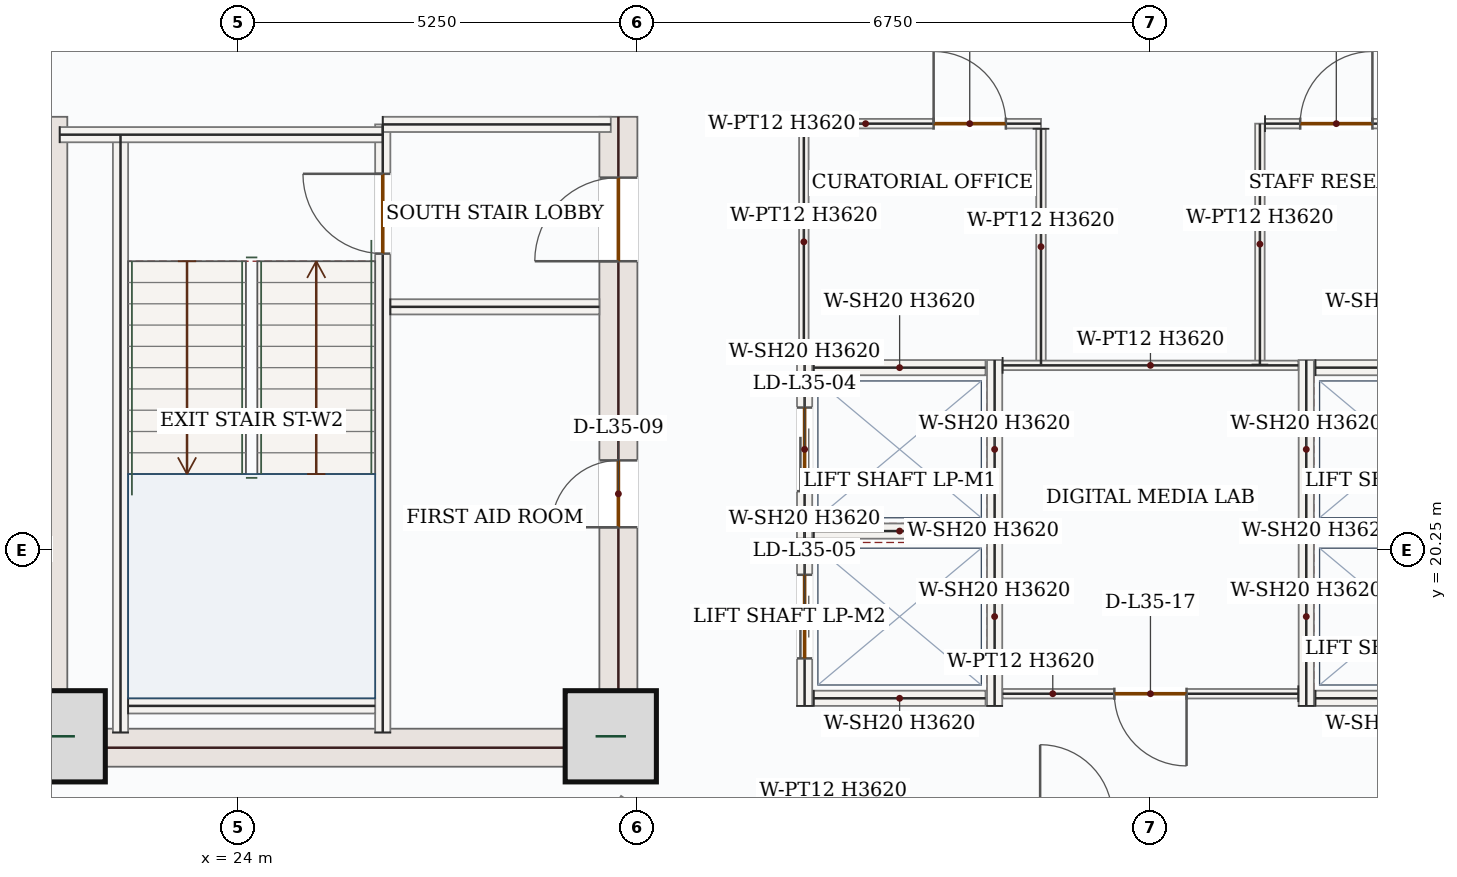
"""IFC4 building model, lengths in metres.
Left out: names, types, materials, properties, quantities, classifications, styles, units other than length and angle.
Written with IfcOpenShell. Run it as: python <this file> out.ifc"""

import sys

from ifc_helpers import new_model, si_unit, direction, frame, frame_2d, origin, origin_2d, place, context, subcontext, project, spatial, rectangle, extrude, source, transform, mapped, element, fill, save


model = new_model("IFC4")
c1 = context("Model", 3, precision=1e-05, world=origin(), true_north=direction((0.0, 1.0)))
c2 = subcontext(c1, "Body", "Model", "MODEL_VIEW")
j1 = project(units=[si_unit("LENGTHUNIT", "METRE"), si_unit("PLANEANGLEUNIT", "RADIAN")], contexts=[c1])
p1 = place(None, origin())
s1 = spatial("IfcSite", under=j1, at=p1, CompositionType="ELEMENT")
p2 = place(p1, origin())
s2 = spatial("IfcBuilding", under=s1, at=p2, CompositionType="ELEMENT")
p3 = place(p2, frame((0.0, 0.0, 155.1)))
s3 = spatial("IfcBuildingStorey", under=s2, at=p3, CompositionType="ELEMENT", Elevation=155.1)
m1 = source(origin(), c2, "Body", "SweptSolid", [
    extrude(rectangle(XDim=8.55, YDim=0.5, at=frame_2d((4.275, 0.0))), origin(), (0.0, 0.0, 1.0), 3.62),
])
p4 = place(p3, frame((21.5, 17.4, 0.0), z_axis=(0.0, 0.0, 1.0), x_axis=(0.0, 1.0, 0.0)))
e1 = element("IfcWall", 1, at=p4, inside=s3, PredefinedType="SHEAR", context=c2, shape_type="MappedRepresentation", body=[
    mapped(m1, transform((0.0, 0.0, 0.0), x_axis=(1.0, 0.0, 0.0), y_axis=(0.0, 1.0, 0.0), z_axis=(0.0, 0.0, 1.0), scale=1.0)),
])
p5 = place(p3, frame((29.0, 17.4, 0.0), z_axis=(0.0, 0.0, 1.0), x_axis=(0.0, 1.0, 0.0)))
e2 = element("IfcWall", 2, at=p5, inside=s3, PredefinedType="SHEAR", context=c2, shape_type="SweptSolid", body=[
    extrude(rectangle(XDim=8.55, YDim=0.5, at=frame_2d((4.275, 0.0))), origin(), (0.0, 0.0, 1.0), 3.62),
])
p6 = place(p5, frame((6.65, 0.0, 0.0)))
e3 = element("IfcOpeningElement", 3, at=p6, cuts=e2, PredefinedType="OPENING", context=c2, shape_type="SweptSolid", body=[
    extrude(rectangle(XDim=1.1, YDim=2.2, at=frame_2d((0.55, 1.1))), frame((0.0, 0.26, 0.0), z_axis=(0.0, -1.0, 0.0), x_axis=(1.0, 0.0, 0.0)), (0.0, 0.0, 1.0), 0.52),
])
p7 = place(p5, frame((3.15, 0.0, 0.0)))
e4 = element("IfcOpeningElement", 4, at=p7, cuts=e2, PredefinedType="OPENING", context=c2, shape_type="SweptSolid", body=[
    extrude(rectangle(XDim=0.88, YDim=2.1, at=frame_2d((0.44, 1.05))), frame((0.0, 0.26, 0.0), z_axis=(0.0, -1.0, 0.0), x_axis=(1.0, 0.0, 0.0)), (0.0, 0.0, 1.0), 0.52),
])
m2 = source(origin(), c2, "Body", "SweptSolid", [
    extrude(rectangle(XDim=7.0, YDim=0.5, at=frame_2d((3.5, 0.0))), origin(), (0.0, 0.0, 1.0), 3.62),
])
p8 = place(p3, frame((21.75, 17.65, 0.0), z_axis=(0.0, 0.0, 1.0), x_axis=(1.0, 0.0, 0.0)))
e5 = element("IfcWall", 5, at=p8, inside=s3, PredefinedType="SHEAR", context=c2, shape_type="MappedRepresentation", body=[
    mapped(m2, transform((0.0, 0.0, 0.0), x_axis=(1.0, 0.0, 0.0), y_axis=(0.0, 1.0, 0.0), z_axis=(0.0, 0.0, 1.0), scale=1.0)),
])
m3 = source(origin(), c2, "Body", "SweptSolid", [
    extrude(rectangle(XDim=1.2, YDim=1.2, at=origin_2d()), origin(), (0.0, 0.0, 1.0), 3.9),
])
for number, where, z_axis, x_axis in (
    (6, (21.65, 17.8, 0.0), (0.0, 0.0, 1.0), (1.0, 0.0, 0.0)),
    (7, (28.9, 17.8, 0.0), (0.0, 0.0, 1.0), (1.0, 0.0, 0.0)),
):
    element("IfcColumn", number, at=place(p3, frame(where, z_axis=z_axis, x_axis=x_axis)), inside=s3, PredefinedType="COLUMN", context=c2, shape_type="MappedRepresentation", body=[
        mapped(m3, transform((0.0, 0.0, 0.0), x_axis=(1.0, 0.0, 0.0), y_axis=(0.0, 1.0, 0.0), z_axis=(0.0, 0.0, 1.0), scale=1.0)),
    ])
p9 = place(p3, frame((22.658, 14.74, 0.0), z_axis=(0.0, 0.0, 1.0), x_axis=(-0.707106781187, 0.707106781187, 0.0)))
e8 = element("IfcWall", 8, at=p9, inside=s3, PredefinedType="SOLIDWALL", context=c2, shape_type="SweptSolid", body=[
    extrude(rectangle(XDim=3.544, YDim=0.28, at=frame_2d((1.772, 0.0))), origin(), (0.0, 0.0, 1.0), 3.62),
])
p10 = place(p9, frame((0.872, 0.0, 0.85)))
e9 = element("IfcOpeningElement", 9, at=p10, cuts=e8, PredefinedType="OPENING", context=c2, shape_type="SweptSolid", body=[
    extrude(rectangle(XDim=1.8, YDim=1.75, at=frame_2d((0.9, 0.875))), frame((0.0, 0.15, 0.0), z_axis=(0.0, -1.0, 0.0), x_axis=(1.0, 0.0, 0.0)), (0.0, 0.0, 1.0), 0.3),
])
m4 = source(origin(), c2, "Body", "SweptSolid", [
    extrude(rectangle(XDim=7.87, YDim=0.2, at=frame_2d((3.935, 0.0))), origin(), (0.0, 0.0, 1.0), 3.62),
])
p11 = place(p3, frame((22.45, 17.85, 0.0), z_axis=(0.0, 0.0, 1.0), x_axis=(0.0, 1.0, 0.0)))
e10 = element("IfcWall", 10, at=p11, inside=s3, PredefinedType="SOLIDWALL", context=c2, shape_type="MappedRepresentation", body=[
    mapped(m4, transform((0.0, 0.0, 0.0), x_axis=(1.0, 0.0, 0.0), y_axis=(0.0, 1.0, 0.0), z_axis=(0.0, 0.0, 1.0), scale=1.0)),
])
p12 = place(p3, frame((25.9, 17.85, 0.0), z_axis=(0.0, 0.0, 1.0), x_axis=(0.0, 1.0, 0.0)))
e11 = element("IfcWall", 11, at=p12, inside=s3, PredefinedType="SOLIDWALL", context=c2, shape_type="SweptSolid", body=[
    extrude(rectangle(XDim=8.0, YDim=0.2, at=frame_2d((4.0, 0.0))), origin(), (0.0, 0.0, 1.0), 3.62),
])
p13 = place(p12, frame((6.3, 0.0, 0.0)))
e12 = element("IfcOpeningElement", 12, at=p13, cuts=e11, PredefinedType="OPENING", context=c2, shape_type="SweptSolid", body=[
    extrude(rectangle(XDim=1.05, YDim=2.15, at=frame_2d((0.525, 1.075))), frame((0.0, 0.11, 0.0), z_axis=(0.0, -1.0, 0.0), x_axis=(1.0, 0.0, 0.0)), (0.0, 0.0, 1.0), 0.22),
])
m5 = source(origin(), c2, "Body", "SweptSolid", [
    extrude(rectangle(XDim=4.25, YDim=0.2, at=frame_2d((2.125, 0.0))), origin(), (0.0, 0.0, 1.0), 3.62),
])
p14 = place(p3, frame((21.65, 25.715, 0.0), z_axis=(0.0, 0.0, 1.0), x_axis=(1.0, 0.0, 0.0)))
e13 = element("IfcWall", 13, at=p14, inside=s3, PredefinedType="SOLIDWALL", context=c2, shape_type="MappedRepresentation", body=[
    mapped(m5, transform((0.0, 0.0, 0.0), x_axis=(1.0, 0.0, 0.0), y_axis=(0.0, 1.0, 0.0), z_axis=(0.0, 0.0, 1.0), scale=1.0)),
])
m6 = source(origin(), c2, "Body", "SweptSolid", [
    extrude(rectangle(XDim=3.0, YDim=0.2, at=frame_2d((1.5, 0.0))), origin(), (0.0, 0.0, 1.0), 3.62),
])
p15 = place(p3, frame((25.9, 25.85, 0.0), z_axis=(0.0, 0.0, 1.0), x_axis=(1.0, 0.0, 0.0)))
e14 = element("IfcWall", 14, at=p15, inside=s3, PredefinedType="SOLIDWALL", context=c2, shape_type="MappedRepresentation", body=[
    mapped(m6, transform((0.0, 0.0, 0.0), x_axis=(1.0, 0.0, 0.0), y_axis=(0.0, 1.0, 0.0), z_axis=(0.0, 0.0, 1.0), scale=1.0)),
])
m7 = source(origin(), c2, "Body", "SweptSolid", [
    extrude(rectangle(XDim=3.25, YDim=0.2, at=frame_2d((1.625, 0.0))), origin(), (0.0, 0.0, 1.0), 3.62),
])
p16 = place(p3, frame((22.55, 18.2, 0.0), z_axis=(0.0, 0.0, 1.0), x_axis=(1.0, 0.0, 0.0)))
e15 = element("IfcWall", 15, at=p16, inside=s3, PredefinedType="SOLIDWALL", context=c2, shape_type="MappedRepresentation", body=[
    mapped(m7, transform((0.0, 0.0, 0.0), x_axis=(1.0, 0.0, 0.0), y_axis=(0.0, 1.0, 0.0), z_axis=(0.0, 0.0, 1.0), scale=1.0)),
])
m8 = source(origin(), c2, "Body", "SweptSolid", [
    extrude(rectangle(XDim=2.75, YDim=0.2, at=frame_2d((1.375, 0.0))), origin(), (0.0, 0.0, 1.0), 3.62),
])
p17 = place(p3, frame((26.0, 23.45, 0.0), z_axis=(0.0, 0.0, 1.0), x_axis=(1.0, 0.0, 0.0)))
e16 = element("IfcWall", 16, at=p17, inside=s3, PredefinedType="SOLIDWALL", context=c2, shape_type="MappedRepresentation", body=[
    mapped(m8, transform((0.0, 0.0, 0.0), x_axis=(1.0, 0.0, 0.0), y_axis=(0.0, 1.0, 0.0), z_axis=(0.0, 0.0, 1.0), scale=1.0)),
])
p18 = place(p3, frame((31.45, 20.4, 0.0), z_axis=(0.0, 0.0, 1.0), x_axis=(0.0, 1.0, 0.0)))
e17 = element("IfcWall", 17, at=p18, inside=s3, PredefinedType="SOLIDWALL", context=c2, shape_type="SweptSolid", body=[
    extrude(rectangle(XDim=2.35, YDim=0.2, at=frame_2d((1.175, 0.0))), origin(), (0.0, 0.0, 1.0), 3.62),
])
p19 = place(p18, frame((0.625, 0.0, 0.0)))
e18 = element("IfcOpeningElement", 18, at=p19, cuts=e17, PredefinedType="OPENING", context=c2, shape_type="SweptSolid", body=[
    extrude(rectangle(XDim=1.1, YDim=2.15, at=frame_2d((0.55, 1.075))), frame((0.0, 0.11, 0.0), z_axis=(0.0, -1.0, 0.0), x_axis=(1.0, 0.0, 0.0)), (0.0, 0.0, 1.0), 0.22),
])
m9 = source(origin(), c2, "Body", "SweptSolid", [
    extrude(rectangle(XDim=2.35, YDim=0.2, at=frame_2d((1.175, 0.0))), origin(), (0.0, 0.0, 1.0), 3.62),
])
p20 = place(p3, frame((33.95, 20.4, 0.0), z_axis=(0.0, 0.0, 1.0), x_axis=(0.0, 1.0, 0.0)))
e19 = element("IfcWall", 19, at=p20, inside=s3, PredefinedType="SOLIDWALL", context=c2, shape_type="MappedRepresentation", body=[
    mapped(m9, transform((0.0, 0.0, 0.0), x_axis=(1.0, 0.0, 0.0), y_axis=(0.0, 1.0, 0.0), z_axis=(0.0, 0.0, 1.0), scale=1.0)),
])
m10 = source(origin(), c2, "Body", "SweptSolid", [
    extrude(rectangle(XDim=2.26, YDim=0.2, at=frame_2d((1.13, 0.0))), origin(), (0.0, 0.0, 1.0), 3.62),
])
for number, where, z_axis, x_axis in (
    (20, (31.57, 20.5, 0.0), (0.0, 0.0, 1.0), (1.0, 0.0, 0.0)),
    (21, (31.57, 22.65, 0.0), (0.0, 0.0, 1.0), (1.0, 0.0, 0.0)),
):
    element("IfcWall", number, at=place(p3, frame(where, z_axis=z_axis, x_axis=x_axis)), inside=s3, PredefinedType="SOLIDWALL", context=c2, shape_type="MappedRepresentation", body=[
        mapped(m10, transform((0.0, 0.0, 0.0), x_axis=(1.0, 0.0, 0.0), y_axis=(0.0, 1.0, 0.0), z_axis=(0.0, 0.0, 1.0), scale=1.0)),
    ])
p21 = place(p3, frame((31.45, 18.2, 0.0), z_axis=(0.0, 0.0, 1.0), x_axis=(0.0, 1.0, 0.0)))
e22 = element("IfcWall", 22, at=p21, inside=s3, PredefinedType="SOLIDWALL", context=c2, shape_type="SweptSolid", body=[
    extrude(rectangle(XDim=2.35, YDim=0.2, at=frame_2d((1.175, 0.0))), origin(), (0.0, 0.0, 1.0), 3.62),
])
p22 = place(p21, frame((0.625, 0.0, 0.0)))
e23 = element("IfcOpeningElement", 23, at=p22, cuts=e22, PredefinedType="OPENING", context=c2, shape_type="SweptSolid", body=[
    extrude(rectangle(XDim=1.1, YDim=2.15, at=frame_2d((0.55, 1.075))), frame((0.0, 0.11, 0.0), z_axis=(0.0, -1.0, 0.0), x_axis=(1.0, 0.0, 0.0)), (0.0, 0.0, 1.0), 0.22),
])
p23 = place(p3, frame((33.95, 18.2, 0.0), z_axis=(0.0, 0.0, 1.0), x_axis=(0.0, 1.0, 0.0)))
e24 = element("IfcWall", 24, at=p23, inside=s3, PredefinedType="SOLIDWALL", context=c2, shape_type="MappedRepresentation", body=[
    mapped(m9, transform((0.0, 0.0, 0.0), x_axis=(1.0, 0.0, 0.0), y_axis=(0.0, 1.0, 0.0), z_axis=(0.0, 0.0, 1.0), scale=1.0)),
])
p24 = place(p3, frame((31.57, 18.3, 0.0), z_axis=(0.0, 0.0, 1.0), x_axis=(1.0, 0.0, 0.0)))
e25 = element("IfcWall", 25, at=p24, inside=s3, PredefinedType="SOLIDWALL", context=c2, shape_type="MappedRepresentation", body=[
    mapped(m10, transform((0.0, 0.0, 0.0), x_axis=(1.0, 0.0, 0.0), y_axis=(0.0, 1.0, 0.0), z_axis=(0.0, 0.0, 1.0), scale=1.0)),
])
p25 = place(p3, frame((38.05, 20.4, 0.0), z_axis=(0.0, 0.0, 1.0), x_axis=(0.0, 1.0, 0.0)))
e26 = element("IfcWall", 26, at=p25, inside=s3, PredefinedType="SOLIDWALL", context=c2, shape_type="MappedRepresentation", body=[
    mapped(m9, transform((0.0, 0.0, 0.0), x_axis=(1.0, 0.0, 0.0), y_axis=(0.0, 1.0, 0.0), z_axis=(0.0, 0.0, 1.0), scale=1.0)),
])
for number, where, z_axis, x_axis in (
    (27, (38.17, 20.5, 0.0), (0.0, 0.0, 1.0), (1.0, 0.0, 0.0)),
    (28, (38.17, 22.65, 0.0), (0.0, 0.0, 1.0), (1.0, 0.0, 0.0)),
):
    element("IfcWall", number, at=place(p3, frame(where, z_axis=z_axis, x_axis=x_axis)), inside=s3, PredefinedType="SOLIDWALL", context=c2, shape_type="MappedRepresentation", body=[
        mapped(m10, transform((0.0, 0.0, 0.0), x_axis=(1.0, 0.0, 0.0), y_axis=(0.0, 1.0, 0.0), z_axis=(0.0, 0.0, 1.0), scale=1.0)),
    ])
p26 = place(p3, frame((38.05, 18.2, 0.0), z_axis=(0.0, 0.0, 1.0), x_axis=(0.0, 1.0, 0.0)))
e29 = element("IfcWall", 29, at=p26, inside=s3, PredefinedType="SOLIDWALL", context=c2, shape_type="MappedRepresentation", body=[
    mapped(m9, transform((0.0, 0.0, 0.0), x_axis=(1.0, 0.0, 0.0), y_axis=(0.0, 1.0, 0.0), z_axis=(0.0, 0.0, 1.0), scale=1.0)),
])
p27 = place(p3, frame((38.17, 18.3, 0.0), z_axis=(0.0, 0.0, 1.0), x_axis=(1.0, 0.0, 0.0)))
e30 = element("IfcWall", 30, at=p27, inside=s3, PredefinedType="SOLIDWALL", context=c2, shape_type="MappedRepresentation", body=[
    mapped(m10, transform((0.0, 0.0, 0.0), x_axis=(1.0, 0.0, 0.0), y_axis=(0.0, 1.0, 0.0), z_axis=(0.0, 0.0, 1.0), scale=1.0)),
])
m11 = source(origin(), c2, "Body", "SweptSolid", [
    extrude(rectangle(XDim=3.11, YDim=0.125, at=frame_2d((1.555, 0.0))), origin(), (0.0, 0.0, 1.0), 3.62),
])
p28 = place(p3, frame((31.44, 22.75, 0.0), z_axis=(0.0, 0.0, 1.0), x_axis=(0.0, 1.0, 0.0)))
e31 = element("IfcWall", 31, at=p28, inside=s3, PredefinedType="PARTITIONING", context=c2, shape_type="MappedRepresentation", body=[
    mapped(m11, transform((0.0, 0.0, 0.0), x_axis=(1.0, 0.0, 0.0), y_axis=(0.0, 1.0, 0.0), z_axis=(0.0, 0.0, 1.0), scale=1.0)),
])
p29 = place(p3, frame((31.508, 25.86, 0.0), z_axis=(0.0, 0.0, 1.0), x_axis=(1.0, 0.0, 0.0)))
e32 = element("IfcWall", 32, at=p29, inside=s3, PredefinedType="PARTITIONING", context=c2, shape_type="SweptSolid", body=[
    extrude(rectangle(XDim=3.052, YDim=0.125, at=frame_2d((1.526, 0.0))), origin(), (0.0, 0.0, 1.0), 3.62),
])
p30 = place(p29, frame((1.64, 0.0, 0.0)))
e33 = element("IfcOpeningElement", 33, at=p30, cuts=e32, PredefinedType="OPENING", context=c2, shape_type="SweptSolid", body=[
    extrude(rectangle(XDim=0.95, YDim=2.15, at=frame_2d((0.475, 1.075))), frame((0.0, 0.073, 0.0), z_axis=(0.0, -1.0, 0.0), x_axis=(1.0, 0.0, 0.0)), (0.0, 0.0, 1.0), 0.145),
])
m12 = source(origin(), c2, "Body", "SweptSolid", [
    extrude(rectangle(XDim=3.103, YDim=0.125, at=frame_2d((1.551, 0.0))), origin(), (0.0, 0.0, 1.0), 3.62),
])
p31 = place(p3, frame((34.56, 25.792, 0.0), z_axis=(0.0, 0.0, 1.0), x_axis=(0.0, -1.0, 0.0)))
e34 = element("IfcWall", 34, at=p31, inside=s3, PredefinedType="PARTITIONING", context=c2, shape_type="MappedRepresentation", body=[
    mapped(m12, transform((0.0, 0.0, 0.0), x_axis=(1.0, 0.0, 0.0), y_axis=(0.0, 1.0, 0.0), z_axis=(0.0, 0.0, 1.0), scale=1.0)),
])
m13 = source(origin(), c2, "Body", "SweptSolid", [
    extrude(rectangle(XDim=3.17, YDim=0.125, at=frame_2d((1.585, 0.0))), origin(), (0.0, 0.0, 1.0), 3.62),
])
p32 = place(p3, frame((37.44, 22.69, 0.0), z_axis=(0.0, 0.0, 1.0), x_axis=(0.0, 1.0, 0.0)))
e35 = element("IfcWall", 35, at=p32, inside=s3, PredefinedType="PARTITIONING", context=c2, shape_type="MappedRepresentation", body=[
    mapped(m13, transform((0.0, 0.0, 0.0), x_axis=(1.0, 0.0, 0.0), y_axis=(0.0, 1.0, 0.0), z_axis=(0.0, 0.0, 1.0), scale=1.0)),
])
p33 = place(p3, frame((37.508, 25.86, 0.0), z_axis=(0.0, 0.0, 1.0), x_axis=(1.0, 0.0, 0.0)))
e36 = element("IfcWall", 36, at=p33, inside=s3, PredefinedType="PARTITIONING", context=c2, shape_type="SweptSolid", body=[
    extrude(rectangle(XDim=3.052, YDim=0.125, at=frame_2d((1.526, 0.0))), origin(), (0.0, 0.0, 1.0), 3.62),
])
p34 = place(p33, frame((0.463, 0.0, 0.0)))
e37 = element("IfcOpeningElement", 37, at=p34, cuts=e36, PredefinedType="OPENING", context=c2, shape_type="SweptSolid", body=[
    extrude(rectangle(XDim=0.95, YDim=2.15, at=frame_2d((0.475, 1.075))), frame((0.0, 0.073, 0.0), z_axis=(0.0, -1.0, 0.0), x_axis=(1.0, 0.0, 0.0)), (0.0, 0.0, 1.0), 0.145),
])
m14 = source(origin(), c2, "Body", "SweptSolid", [
    extrude(rectangle(XDim=3.89, YDim=0.125, at=frame_2d((1.945, 0.0))), origin(), (0.0, 0.0, 1.0), 3.62),
])
p35 = place(p3, frame((34.055, 22.68, 0.0), z_axis=(0.0, 0.0, 1.0), x_axis=(1.0, 0.0, 0.0)))
e38 = element("IfcWall", 38, at=p35, inside=s3, PredefinedType="PARTITIONING", context=c2, shape_type="MappedRepresentation", body=[
    mapped(m14, transform((0.0, 0.0, 0.0), x_axis=(1.0, 0.0, 0.0), y_axis=(0.0, 1.0, 0.0), z_axis=(0.0, 0.0, 1.0), scale=1.0)),
])
p36 = place(p3, frame((37.945, 18.36, 0.0), z_axis=(0.0, 0.0, 1.0), x_axis=(-1.0, 0.0, 0.0)))
e39 = element("IfcWall", 39, at=p36, inside=s3, PredefinedType="PARTITIONING", context=c2, shape_type="SweptSolid", body=[
    extrude(rectangle(XDim=3.89, YDim=0.125, at=frame_2d((1.945, 0.0))), origin(), (0.0, 0.0, 1.0), 3.62),
])
p37 = place(p36, frame((1.47, 0.0, 0.0)))
e40 = element("IfcOpeningElement", 40, at=p37, cuts=e39, PredefinedType="OPENING", context=c2, shape_type="SweptSolid", body=[
    extrude(rectangle(XDim=0.95, YDim=2.15, at=frame_2d((0.475, 1.075))), frame((0.0, 0.073, 0.0), z_axis=(0.0, -1.0, 0.0), x_axis=(1.0, 0.0, 0.0)), (0.0, 0.0, 1.0), 0.145),
])
m15 = source(origin(), c2, "Body", "SweptSolid", [
    extrude(rectangle(XDim=2.53, YDim=0.125, at=frame_2d((1.265, 0.0))), origin(), (0.0, 0.0, 1.0), 3.62),
])
p38 = place(p3, frame((27.67, 14.885, 0.0), z_axis=(0.0, 0.0, 1.0), x_axis=(0.560455418396, 0.82818459536, 0.0)))
e41 = element("IfcWall", 41, at=p38, inside=s3, PredefinedType="PARTITIONING", context=c2, shape_type="MappedRepresentation", body=[
    mapped(m15, transform((0.0, 0.0, 0.0), x_axis=(1.0, 0.0, 0.0), y_axis=(0.0, 1.0, 0.0), z_axis=(0.0, 0.0, 1.0), scale=1.0)),
])
m16 = source(origin(), c2, "Body", "SweptSolid", [
    extrude(rectangle(XDim=1.05, YDim=2.15, at=frame_2d((0.525, 1.075))), frame((0.0, 0.025, 0.0), z_axis=(0.0, -1.0, 0.0), x_axis=(1.0, 0.0, 0.0)), (0.0, 0.0, 1.0), 0.05),
])
p39 = place(p13, origin())
e42 = element("IfcDoor", 42, at=p39, inside=s3, OperationType="SINGLE_SWING_RIGHT", PredefinedType="DOOR", context=c2, shape_type="MappedRepresentation", body=[
    mapped(m16, transform((0.0, 0.0, 0.0), x_axis=(1.0, 0.0, 0.0), y_axis=(0.0, 1.0, 0.0), z_axis=(0.0, 0.0, 1.0), scale=1.0)),
])
fill(e12, e42)
m17 = source(origin(), c2, "Body", "SweptSolid", [
    extrude(rectangle(XDim=1.1, YDim=2.2, at=frame_2d((0.55, 1.1))), frame((0.0, 0.025, 0.0), z_axis=(0.0, -1.0, 0.0), x_axis=(1.0, 0.0, 0.0)), (0.0, 0.0, 1.0), 0.05),
])
p40 = place(p6, origin())
e43 = element("IfcDoor", 43, at=p40, inside=s3, OperationType="SINGLE_SWING_LEFT", PredefinedType="DOOR", context=c2, shape_type="MappedRepresentation", body=[
    mapped(m17, transform((0.0, 0.0, 0.0), x_axis=(1.0, 0.0, 0.0), y_axis=(0.0, 1.0, 0.0), z_axis=(0.0, 0.0, 1.0), scale=1.0)),
])
fill(e3, e43)
m18 = source(origin(), c2, "Body", "SweptSolid", [
    extrude(rectangle(XDim=0.88, YDim=2.1, at=frame_2d((0.44, 1.05))), frame((0.0, 0.025, 0.0), z_axis=(0.0, -1.0, 0.0), x_axis=(1.0, 0.0, 0.0)), (0.0, 0.0, 1.0), 0.05),
])
p41 = place(p7, origin())
e44 = element("IfcDoor", 44, at=p41, inside=s3, OperationType="SINGLE_SWING_LEFT", PredefinedType="DOOR", context=c2, shape_type="MappedRepresentation", body=[
    mapped(m18, transform((0.0, 0.0, 0.0), x_axis=(1.0, 0.0, 0.0), y_axis=(0.0, 1.0, 0.0), z_axis=(0.0, 0.0, 1.0), scale=1.0)),
])
fill(e4, e44)
m19 = source(origin(), c2, "Body", "SweptSolid", [
    extrude(rectangle(XDim=1.1, YDim=2.15, at=frame_2d((0.55, 1.075))), frame((0.0, 0.025, 0.0), z_axis=(0.0, -1.0, 0.0), x_axis=(1.0, 0.0, 0.0)), (0.0, 0.0, 1.0), 0.05),
])
p42 = place(p19, origin())
e45 = element("IfcDoor", 45, at=p42, inside=s3, OperationType="DOUBLE_DOOR_SLIDING", PredefinedType="DOOR", context=c2, shape_type="MappedRepresentation", body=[
    mapped(m19, transform((0.0, 0.0, 0.0), x_axis=(1.0, 0.0, 0.0), y_axis=(0.0, 1.0, 0.0), z_axis=(0.0, 0.0, 1.0), scale=1.0)),
])
fill(e18, e45)
p43 = place(p22, origin())
e46 = element("IfcDoor", 46, at=p43, inside=s3, OperationType="DOUBLE_DOOR_SLIDING", PredefinedType="DOOR", context=c2, shape_type="MappedRepresentation", body=[
    mapped(m19, transform((0.0, 0.0, 0.0), x_axis=(1.0, 0.0, 0.0), y_axis=(0.0, 1.0, 0.0), z_axis=(0.0, 0.0, 1.0), scale=1.0)),
])
fill(e23, e46)
m20 = source(origin(), c2, "Body", "SweptSolid", [
    extrude(rectangle(XDim=0.95, YDim=2.15, at=frame_2d((0.475, 1.075))), frame((0.0, 0.025, 0.0), z_axis=(0.0, -1.0, 0.0), x_axis=(1.0, 0.0, 0.0)), (0.0, 0.0, 1.0), 0.05),
])
p44 = place(p30, origin())
e47 = element("IfcDoor", 47, at=p44, inside=s3, OperationType="SINGLE_SWING_LEFT", PredefinedType="DOOR", context=c2, shape_type="MappedRepresentation", body=[
    mapped(m20, transform((0.0, 0.0, 0.0), x_axis=(1.0, 0.0, 0.0), y_axis=(0.0, 1.0, 0.0), z_axis=(0.0, 0.0, 1.0), scale=1.0)),
])
fill(e33, e47)
p45 = place(p34, origin())
e48 = element("IfcDoor", 48, at=p45, inside=s3, OperationType="SINGLE_SWING_RIGHT", PredefinedType="DOOR", context=c2, shape_type="MappedRepresentation", body=[
    mapped(m20, transform((0.0, 0.0, 0.0), x_axis=(1.0, 0.0, 0.0), y_axis=(0.0, 1.0, 0.0), z_axis=(0.0, 0.0, 1.0), scale=1.0)),
])
fill(e37, e48)
p46 = place(p37, origin())
e49 = element("IfcDoor", 49, at=p46, inside=s3, OperationType="SINGLE_SWING_LEFT", PredefinedType="DOOR", context=c2, shape_type="MappedRepresentation", body=[
    mapped(m20, transform((0.0, 0.0, 0.0), x_axis=(1.0, 0.0, 0.0), y_axis=(0.0, 1.0, 0.0), z_axis=(0.0, 0.0, 1.0), scale=1.0)),
])
fill(e40, e49)
save(model, sys.argv[1])
